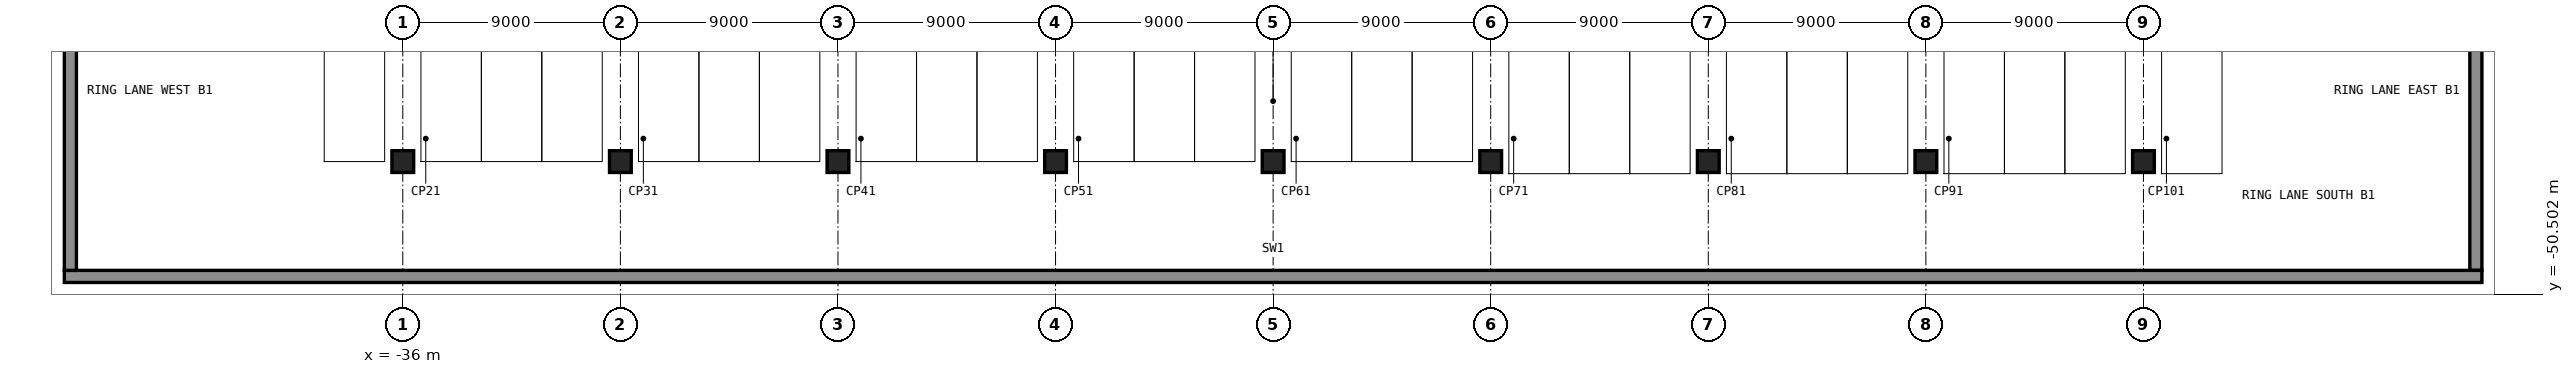
"""IFC4 building model, lengths in metres.
Left out: names, types, materials, properties, quantities, classifications, styles, units other than length and angle.
Written with IfcOpenShell. Run it as: python <this file> out.ifc"""

import sys

from ifc_helpers import new_model, si_unit, direction, frame, frame_2d, origin, origin_2d, place, context, subcontext, project, spatial, rectangle, extrude, element, save


model = new_model("IFC4")
c1 = context("Model", 3, precision=1e-05, world=origin(), true_north=direction((0.0, 1.0)))
c2 = subcontext(c1, "Body", "Model", "MODEL_VIEW")
j1 = project(units=[si_unit("LENGTHUNIT", "METRE"), si_unit("PLANEANGLEUNIT", "RADIAN")], contexts=[c1])
p1 = place(None, origin())
s1 = spatial("IfcSite", under=j1, at=p1, CompositionType="ELEMENT")
p2 = place(p1, origin())
s2 = spatial("IfcBuilding", under=s1, at=p2, CompositionType="ELEMENT")
p3 = place(p2, frame((0.0, 0.0, -4.5)))
s3 = spatial("IfcBuildingStorey", under=s2, at=p3, CompositionType="ELEMENT", Elevation=-4.5)
p4 = place(p3, frame((-50.0, -49.75, -0.3), z_axis=(0.0, 0.0, 1.0), x_axis=(1.0, 0.0, 0.0)))
e1 = element("IfcWall", 1, at=p4, inside=s3, PredefinedType="SOLIDWALL", context=c2, shape_type="SweptSolid", body=[
    extrude(rectangle(XDim=100.0, YDim=0.5, at=frame_2d((50.0, 0.0))), origin(), (0.0, 0.0, 1.0), 4.8),
])
for number, where, z_axis, x_axis in (
    (2, (49.75, -49.5, -0.3), (0.0, 0.0, 1.0), (0.0, 1.0, 0.0)),
    (3, (-49.75, -49.5, -0.3), (0.0, 0.0, 1.0), (0.0, 1.0, 0.0)),
):
    element("IfcWall", number, at=place(p3, frame(where, z_axis=z_axis, x_axis=x_axis)), inside=s3, PredefinedType="SOLIDWALL", context=c2, shape_type="SweptSolid", body=[
        extrude(rectangle(XDim=99.0, YDim=0.5, at=frame_2d((49.5, 0.0))), origin(), (0.0, 0.0, 1.0), 4.8),
    ])
for number, where, z_axis, x_axis in (
    (4, (-36.0, -45.0, -0.3), (0.0, 0.0, 1.0), (1.0, 0.0, 0.0)),
    (5, (-27.0, -45.0, -0.3), (0.0, 0.0, 1.0), (1.0, 0.0, 0.0)),
    (6, (-18.0, -45.0, -0.3), (0.0, 0.0, 1.0), (1.0, 0.0, 0.0)),
    (7, (-9.0, -45.0, -0.3), (0.0, 0.0, 1.0), (1.0, 0.0, 0.0)),
    (8, (0.0, -45.0, -0.3), (0.0, 0.0, 1.0), (1.0, 0.0, 0.0)),
    (9, (9.0, -45.0, -0.3), (0.0, 0.0, 1.0), (1.0, 0.0, 0.0)),
    (10, (18.0, -45.0, -0.3), (0.0, 0.0, 1.0), (1.0, 0.0, 0.0)),
    (11, (27.0, -45.0, -0.3), (0.0, 0.0, 1.0), (1.0, 0.0, 0.0)),
    (12, (36.0, -45.0, -0.3), (0.0, 0.0, 1.0), (1.0, 0.0, 0.0)),
):
    element("IfcColumn", number, at=place(p3, frame(where, z_axis=z_axis, x_axis=x_axis)), inside=s3, PredefinedType="COLUMN", context=c2, shape_type="SweptSolid", body=[
        extrude(rectangle(XDim=0.9, YDim=0.9, at=origin_2d()), origin(), (0.0, 0.0, 1.0), 4.4),
    ])
save(model, sys.argv[1])
